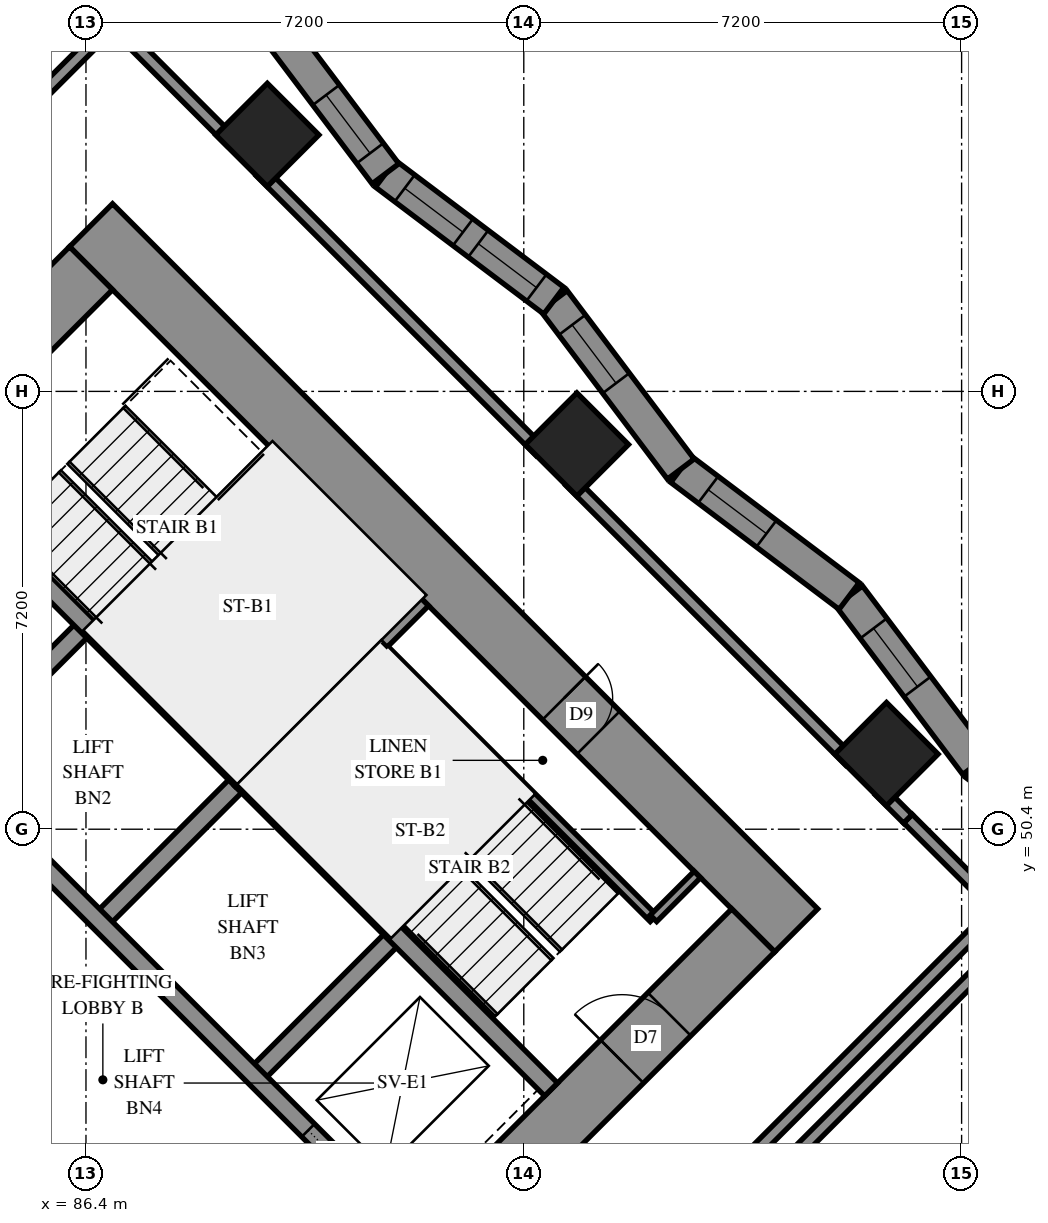
"""IFC4 building model, lengths in metres.
Left out: names, types, materials, properties, quantities, classifications, styles, units other than length and angle.
Written with IfcOpenShell. Run it as: python <this file> out.ifc"""

import sys

from ifc_helpers import new_model, si_unit, direction, frame, frame_2d, origin, origin_2d, place, context, subcontext, project, spatial, polyline, rectangle, outline, extrude, element, fill, save


model = new_model("IFC4")
c1 = context("Model", 3, precision=1e-05, world=origin(), true_north=direction((0.0, 1.0)))
c2 = subcontext(c1, "Body", "Model", "MODEL_VIEW")
j1 = project(units=[si_unit("LENGTHUNIT", "METRE"), si_unit("PLANEANGLEUNIT", "RADIAN")], contexts=[c1])
p1 = place(None, origin())
s1 = spatial("IfcSite", under=j1, at=p1, CompositionType="ELEMENT")
p2 = place(p1, origin())
s2 = spatial("IfcBuilding", under=s1, at=p2, CompositionType="ELEMENT")
p3 = place(p2, frame((0.0, 0.0, 47.4)))
s3 = spatial("IfcBuildingStorey", under=s2, at=p3, CompositionType="ELEMENT", Elevation=47.4)
for number, where, z_axis, x_axis in (
    (1, (89.382, 61.818, 0.0), (0.0, 0.0, 1.0), (0.707, -0.707, 0.0)),
    (2, (94.474, 56.727, 0.0), (0.0, 0.0, 1.0), (0.707, -0.707, 0.0)),
    (3, (99.565, 51.635, 0.0), (0.0, 0.0, 1.0), (0.707, -0.707, 0.0)),
):
    element("IfcColumn", number, at=place(p3, frame(where, z_axis=z_axis, x_axis=x_axis)), inside=s3, PredefinedType="COLUMN", context=c2, shape_type="SweptSolid", body=[
        extrude(rectangle(XDim=1.2, YDim=1.2, at=origin_2d()), origin(), (0.0, 0.0, 1.0), 3.1),
    ])
p4 = place(p3, frame((75.594, 49.443, -0.3), z_axis=(0.0, 0.0, 1.0), x_axis=(0.7071037324, -0.70710983, 0.0)))
e4 = element("IfcWall", 4, at=p4, inside=s3, PredefinedType="SHEAR", context=c2, shape_type="SweptSolid", body=[
    extrude(rectangle(XDim=16.4, YDim=1.0, at=frame_2d((8.2, 0.0))), origin(), (0.0, 0.0, 1.0), 2.7),
])
p5 = place(p3, frame((86.483, 60.333, -0.3), z_axis=(0.0, 0.0, 1.0), x_axis=(0.70710983, -0.7071037324, 0.0)))
e5 = element("IfcWall", 5, at=p5, inside=s3, PredefinedType="SHEAR", context=c2, shape_type="SweptSolid", body=[
    extrude(rectangle(XDim=16.4, YDim=1.0, at=frame_2d((8.2, 0.0))), origin(), (0.0, 0.0, 1.0), 2.7),
])
p6 = place(p5, frame((11.0, 0.0, 0.3)))
e6 = element("IfcOpeningElement", 6, at=p6, cuts=e5, PredefinedType="OPENING", context=c2, shape_type="SweptSolid", body=[
    extrude(rectangle(XDim=0.8, YDim=2.1, at=frame_2d((0.4, 1.05))), frame((0.0, 0.51, 0.0), z_axis=(0.0, -1.0, 0.0), x_axis=(1.0, 0.0, 0.0)), (0.0, 0.0, 1.0), 1.02),
])
p7 = place(p3, frame((76.301, 49.443, -0.3), z_axis=(0.0, 0.0, 1.0), x_axis=(0.7071067812, 0.7071067812, 0.0)))
e7 = element("IfcWall", 7, at=p7, inside=s3, PredefinedType="SHEAR", context=c2, shape_type="SweptSolid", body=[
    extrude(rectangle(XDim=14.4, YDim=1.0, at=frame_2d((7.2, 0.0))), origin(), (0.0, 0.0, 1.0), 2.7),
])
p8 = place(p7, frame((4.55, 0.0, 0.3)))
e8 = element("IfcOpeningElement", 8, at=p8, cuts=e7, PredefinedType="OPENING", context=c2, shape_type="SweptSolid", body=[
    extrude(rectangle(XDim=1.1, YDim=2.1, at=frame_2d((0.55, 1.05))), frame((0.0, 0.51, 0.0), z_axis=(0.0, -1.0, 0.0), x_axis=(1.0, 0.0, 0.0)), (0.0, 0.0, 1.0), 1.02),
])
p9 = place(p7, frame((11.35, 0.0, 0.3)))
e9 = element("IfcOpeningElement", 9, at=p9, cuts=e7, PredefinedType="OPENING", context=c2, shape_type="SweptSolid", body=[
    extrude(rectangle(XDim=1.1, YDim=2.1, at=frame_2d((0.55, 1.05))), frame((0.0, 0.51, 0.0), z_axis=(0.0, -1.0, 0.0), x_axis=(1.0, 0.0, 0.0)), (0.0, 0.0, 1.0), 1.02),
])
p10 = place(p3, frame((87.19, 38.554, -0.3), z_axis=(0.0, 0.0, 1.0), x_axis=(0.707103309, 0.7071102534, 0.0)))
e10 = element("IfcWall", 10, at=p10, inside=s3, PredefinedType="SHEAR", context=c2, shape_type="SweptSolid", body=[
    extrude(rectangle(XDim=14.4, YDim=1.0, at=frame_2d((7.2, 0.0))), origin(), (0.0, 0.0, 1.0), 2.7),
])
p11 = place(p10, frame((4.55, 0.0, 0.3)))
e11 = element("IfcOpeningElement", 11, at=p11, cuts=e10, PredefinedType="OPENING", context=c2, shape_type="SweptSolid", body=[
    extrude(rectangle(XDim=1.1, YDim=2.1, at=frame_2d((0.55, 1.05))), frame((0.0, 0.51, 0.0), z_axis=(0.0, -1.0, 0.0), x_axis=(1.0, 0.0, 0.0)), (0.0, 0.0, 1.0), 1.02),
])
p12 = place(p10, frame((11.35, 0.0, 0.3)))
e12 = element("IfcOpeningElement", 12, at=p12, cuts=e10, PredefinedType="OPENING", context=c2, shape_type="SweptSolid", body=[
    extrude(rectangle(XDim=1.1, YDim=2.1, at=frame_2d((0.55, 1.05))), frame((0.0, 0.51, 0.0), z_axis=(0.0, -1.0, 0.0), x_axis=(1.0, 0.0, 0.0)), (0.0, 0.0, 1.0), 1.02),
])
p13 = place(p3, frame((84.079, 51.423, 0.0), z_axis=(0.0, 0.0, 1.0), x_axis=(0.7071219326, 0.7070916295, 0.0)))
e13 = element("IfcWall", 13, at=p13, inside=s3, PredefinedType="SOLIDWALL", context=c2, shape_type="SweptSolid", body=[
    extrude(rectangle(XDim=3.3, YDim=0.3, at=frame_2d((1.65, 0.0))), origin(), (0.0, 0.0, 1.0), 3.1),
])
for number, where, z_axis, x_axis in (
    (14, (86.625, 48.878, 0.0), (0.0, 0.0, 1.0), (0.707, 0.707, 0.0)),
    (15, (89.17, 46.332, 0.0), (0.0, 0.0, 1.0), (0.707, 0.707, 0.0)),
):
    element("IfcWall", number, at=place(p3, frame(where, z_axis=z_axis, x_axis=x_axis)), inside=s3, PredefinedType="SOLIDWALL", context=c2, shape_type="SweptSolid", body=[
        extrude(rectangle(XDim=3.3, YDim=0.3, at=frame_2d((1.65, 0.0))), origin(), (0.0, 0.0, 1.0), 3.1),
    ])
p14 = place(p3, frame((78.988, 51.423, 0.0), z_axis=(0.0, 0.0, 1.0), x_axis=(0.7071067812, -0.7071067812, 0.0)))
e16 = element("IfcWall", 16, at=p14, inside=s3, PredefinedType="SOLIDWALL", context=c2, shape_type="SweptSolid", body=[
    extrude(rectangle(XDim=14.4, YDim=0.3, at=frame_2d((7.2, 0.0))), origin(), (0.0, 0.0, 1.0), 3.1),
])
p15 = place(p14, frame((1.25, 0.0, 0.0)))
e17 = element("IfcOpeningElement", 17, at=p15, cuts=e16, PredefinedType="OPENING", context=c2, shape_type="SweptSolid", body=[
    extrude(rectangle(XDim=1.1, YDim=2.1, at=frame_2d((0.55, 1.05))), frame((0.0, 0.16, 0.0), z_axis=(0.0, -1.0, 0.0), x_axis=(1.0, 0.0, 0.0)), (0.0, 0.0, 1.0), 0.32),
])
p16 = place(p14, frame((4.85, 0.0, 0.0)))
e18 = element("IfcOpeningElement", 18, at=p16, cuts=e16, PredefinedType="OPENING", context=c2, shape_type="SweptSolid", body=[
    extrude(rectangle(XDim=1.1, YDim=2.1, at=frame_2d((0.55, 1.05))), frame((0.0, 0.16, 0.0), z_axis=(0.0, -1.0, 0.0), x_axis=(1.0, 0.0, 0.0)), (0.0, 0.0, 1.0), 0.32),
])
p17 = place(p14, frame((8.45, 0.0, 0.0)))
e19 = element("IfcOpeningElement", 19, at=p17, cuts=e16, PredefinedType="OPENING", context=c2, shape_type="SweptSolid", body=[
    extrude(rectangle(XDim=1.1, YDim=2.1, at=frame_2d((0.55, 1.05))), frame((0.0, 0.16, 0.0), z_axis=(0.0, -1.0, 0.0), x_axis=(1.0, 0.0, 0.0)), (0.0, 0.0, 1.0), 0.32),
])
p18 = place(p14, frame((12.05, 0.0, 0.0)))
e20 = element("IfcOpeningElement", 20, at=p18, cuts=e16, PredefinedType="OPENING", context=c2, shape_type="SweptSolid", body=[
    extrude(rectangle(XDim=1.1, YDim=2.1, at=frame_2d((0.55, 1.05))), frame((0.0, 0.16, 0.0), z_axis=(0.0, -1.0, 0.0), x_axis=(1.0, 0.0, 0.0)), (0.0, 0.0, 1.0), 0.32),
])
p19 = place(p3, frame((81.534, 53.969, 0.0), z_axis=(0.0, 0.0, 1.0), x_axis=(0.707103309, -0.7071102534, 0.0)))
e21 = element("IfcWall", 21, at=p19, inside=s3, PredefinedType="SOLIDWALL", context=c2, shape_type="SweptSolid", body=[
    extrude(rectangle(XDim=14.4, YDim=0.3, at=frame_2d((7.2, 0.0))), origin(), (0.0, 0.0, 1.0), 3.1),
])
p20 = place(p19, frame((12.05, 0.0, 0.0)))
e22 = element("IfcOpeningElement", 22, at=p20, cuts=e21, PredefinedType="OPENING", context=c2, shape_type="SweptSolid", body=[
    extrude(rectangle(XDim=1.1, YDim=2.1, at=frame_2d((0.55, 1.05))), frame((0.0, 0.16, 0.0), z_axis=(0.0, -1.0, 0.0), x_axis=(1.0, 0.0, 0.0)), (0.0, 0.0, 1.0), 0.32),
])
for number, where, z_axis, x_axis in (
    (23, (83.867, 56.302, 0.0), (0.0, 0.0, 1.0), (0.707, -0.707, 0.0)),
    (24, (88.958, 51.211, 0.0), (0.0, 0.0, 1.0), (0.707, -0.707, 0.0)),
):
    element("IfcWall", number, at=place(p3, frame(where, z_axis=z_axis, x_axis=x_axis)), inside=s3, PredefinedType="SOLIDWALL", context=c2, shape_type="SweptSolid", body=[
        extrude(rectangle(XDim=7.2, YDim=0.3, at=frame_2d((3.6, 0.0))), origin(), (0.0, 0.0, 1.0), 3.1),
    ])
p21 = place(p3, frame((88.958, 51.211, 0.0), z_axis=(0.0, 0.0, 1.0), x_axis=(0.7071067812, 0.7071067812, 0.0)))
e25 = element("IfcWall", 25, at=p21, inside=s3, PredefinedType="SOLIDWALL", context=c2, shape_type="SweptSolid", body=[
    extrude(rectangle(XDim=4.2, YDim=0.3, at=frame_2d((2.1, 0.0))), origin(), (0.0, 0.0, 1.0), 3.1),
])
p22 = place(p3, frame((103.807, 49.379, 0.0), z_axis=(0.0, 0.0, 1.0), x_axis=(-0.7985338376, 0.6019499233, 0.0)))
e26 = element("IfcWall", 26, at=p22, inside=s3, PredefinedType="SOLIDWALL", context=c2, shape_type="SweptSolid", body=[
    extrude(outline(polyline([(-0.039, -0.275), (3.429, -0.275), (3.506, 0.275), (0.039, 0.275), (-0.039, -0.275)])), origin(), (0.0, 0.0, 1.0), 3.1),
])
p23 = place(p22, frame((1.536, 0.0, 0.5)))
e27 = element("IfcOpeningElement", 27, at=p23, cuts=e26, PredefinedType="OPENING", context=c2, shape_type="SweptSolid", body=[
    extrude(rectangle(XDim=1.2, YDim=2.45, at=frame_2d((0.6, 1.225))), frame((0.0, 0.285, 0.0), z_axis=(0.0, -1.0, 0.0), x_axis=(1.0, 0.0, 0.0)), (0.0, 0.0, 1.0), 0.57),
])
p24 = place(p3, frame((101.038, 51.466, 0.0), z_axis=(0.0, 0.0, 1.0), x_axis=(-0.6019499233, 0.7985338376, 0.0)))
e28 = element("IfcWall", 28, at=p24, inside=s3, PredefinedType="SOLIDWALL", context=c2, shape_type="SweptSolid", body=[
    extrude(outline(polyline([(0.039, -0.275), (3.506, -0.275), (3.429, 0.275), (-0.039, 0.275), (0.039, -0.275)])), origin(), (0.0, 0.0, 1.0), 3.1),
])
p25 = place(p24, frame((1.601, 0.0, 0.5)))
e29 = element("IfcOpeningElement", 29, at=p25, cuts=e28, PredefinedType="OPENING", context=c2, shape_type="SweptSolid", body=[
    extrude(rectangle(XDim=1.2, YDim=2.45, at=frame_2d((0.6, 1.225))), frame((0.0, 0.285, 0.0), z_axis=(0.0, -1.0, 0.0), x_axis=(1.0, 0.0, 0.0)), (0.0, 0.0, 1.0), 0.57),
])
p26 = place(p3, frame((98.951, 54.235, 0.0), z_axis=(0.0, 0.0, 1.0), x_axis=(-0.7985199762, 0.6019683111, 0.0)))
e30 = element("IfcWall", 30, at=p26, inside=s3, PredefinedType="SOLIDWALL", context=c2, shape_type="SweptSolid", body=[
    extrude(outline(polyline([(-0.039, -0.275), (3.429, -0.275), (3.506, 0.275), (0.039, 0.275), (-0.039, -0.275)])), origin(), (0.0, 0.0, 1.0), 3.1),
])
p27 = place(p26, frame((1.704, 0.0, 0.5)))
e31 = element("IfcOpeningElement", 31, at=p27, cuts=e30, PredefinedType="OPENING", context=c2, shape_type="SweptSolid", body=[
    extrude(rectangle(XDim=1.2, YDim=2.45, at=frame_2d((0.6, 1.225))), frame((0.0, 0.285, 0.0), z_axis=(0.0, -1.0, 0.0), x_axis=(1.0, 0.0, 0.0)), (0.0, 0.0, 1.0), 0.57),
])
p28 = place(p3, frame((96.182, 56.323, 0.0), z_axis=(0.0, 0.0, 1.0), x_axis=(-0.601963785, 0.7985233882, 0.0)))
e32 = element("IfcWall", 32, at=p28, inside=s3, PredefinedType="SOLIDWALL", context=c2, shape_type="SweptSolid", body=[
    extrude(outline(polyline([(0.039, -0.275), (3.506, -0.275), (3.429, 0.275), (-0.039, 0.275), (0.039, -0.275)])), origin(), (0.0, 0.0, 1.0), 3.1),
])
p29 = place(p28, frame((1.768, 0.0, 0.5)))
e33 = element("IfcOpeningElement", 33, at=p29, cuts=e32, PredefinedType="OPENING", context=c2, shape_type="SweptSolid", body=[
    extrude(rectangle(XDim=1.2, YDim=2.45, at=frame_2d((0.6, 1.225))), frame((0.0, 0.285, 0.0), z_axis=(0.0, -1.0, 0.0), x_axis=(1.0, 0.0, 0.0)), (0.0, 0.0, 1.0), 0.57),
])
p30 = place(p3, frame((94.094, 59.092, 0.0), z_axis=(0.0, 0.0, 1.0), x_axis=(-0.7985199762, 0.6019683111, 0.0)))
e34 = element("IfcWall", 34, at=p30, inside=s3, PredefinedType="SOLIDWALL", context=c2, shape_type="SweptSolid", body=[
    extrude(outline(polyline([(-0.039, -0.275), (3.429, -0.275), (3.506, 0.275), (0.039, 0.275), (-0.039, -0.275)])), origin(), (0.0, 0.0, 1.0), 3.1),
])
p31 = place(p30, frame((0.357, 0.0, 0.5)))
e35 = element("IfcOpeningElement", 35, at=p31, cuts=e34, PredefinedType="OPENING", context=c2, shape_type="SweptSolid", body=[
    extrude(rectangle(XDim=1.2, YDim=2.45, at=frame_2d((0.6, 1.225))), frame((0.0, 0.285, 0.0), z_axis=(0.0, -1.0, 0.0), x_axis=(1.0, 0.0, 0.0)), (0.0, 0.0, 1.0), 0.57),
])
p32 = place(p30, frame((1.872, 0.0, 0.5)))
e36 = element("IfcOpeningElement", 36, at=p32, cuts=e34, PredefinedType="OPENING", context=c2, shape_type="SweptSolid", body=[
    extrude(rectangle(XDim=1.2, YDim=2.45, at=frame_2d((0.6, 1.225))), frame((0.0, 0.285, 0.0), z_axis=(0.0, -1.0, 0.0), x_axis=(1.0, 0.0, 0.0)), (0.0, 0.0, 1.0), 0.57),
])
p33 = place(p3, frame((91.325, 61.179, 0.0), z_axis=(0.0, 0.0, 1.0), x_axis=(-0.6019499233, 0.7985338376, 0.0)))
e37 = element("IfcWall", 37, at=p33, inside=s3, PredefinedType="SOLIDWALL", context=c2, shape_type="SweptSolid", body=[
    extrude(outline(polyline([(0.039, -0.275), (3.506, -0.275), (3.429, 0.275), (-0.039, 0.275), (0.039, -0.275)])), origin(), (0.0, 0.0, 1.0), 3.1),
])
p34 = place(p33, frame((0.421, 0.0, 0.5)))
e38 = element("IfcOpeningElement", 38, at=p34, cuts=e37, PredefinedType="OPENING", context=c2, shape_type="SweptSolid", body=[
    extrude(rectangle(XDim=1.2, YDim=2.45, at=frame_2d((0.6, 1.225))), frame((0.0, 0.285, 0.0), z_axis=(0.0, -1.0, 0.0), x_axis=(1.0, 0.0, 0.0)), (0.0, 0.0, 1.0), 0.57),
])
p35 = place(p3, frame((91.313, 53.354, 0.0), z_axis=(0.0, 0.0, 1.0), x_axis=(0.7071147811, -0.7070987812, 0.0)))
e39 = element("IfcWall", 39, at=p35, inside=s3, PredefinedType="PARTITIONING", context=c2, shape_type="SweptSolid", body=[
    extrude(rectangle(XDim=6.25, YDim=0.15, at=frame_2d((3.125, 0.0))), origin(), (0.0, 0.0, 1.0), 3.1),
])
p36 = place(p3, frame((95.732, 48.934, 0.0), z_axis=(0.0, 0.0, 1.0), x_axis=(0.7071067812, 0.7071067812, 0.0)))
e40 = element("IfcWall", 40, at=p36, inside=s3, PredefinedType="PARTITIONING", context=c2, shape_type="SweptSolid", body=[
    extrude(rectangle(XDim=1.02, YDim=0.15, at=frame_2d((0.51, 0.0))), origin(), (0.0, 0.0, 1.0), 3.1),
])
p37 = place(p3, frame((95.109, 42.091, 0.0), z_axis=(0.0, 0.0, 1.0), x_axis=(0.7071113741, 0.7071021882, 0.0)))
e41 = element("IfcWall", 41, at=p37, inside=s3, PredefinedType="PARTITIONING", context=c2, shape_type="SweptSolid", body=[
    extrude(rectangle(XDim=10.886, YDim=0.2, at=frame_2d((5.443, 0.0))), origin(), (0.0, 0.0, 1.0), 3.1),
])
p38 = place(p3, frame((94.757, 42.445, 0.0), z_axis=(0.0, 0.0, 1.0), x_axis=(0.7071067812, 0.7071067812, 0.0)))
e42 = element("IfcWall", 42, at=p38, inside=s3, PredefinedType="PARTITIONING", context=c2, shape_type="SweptSolid", body=[
    extrude(rectangle(XDim=9.399, YDim=0.2, at=frame_2d((4.699, 0.0))), origin(), (0.0, 0.0, 1.0), 3.1),
])
p39 = place(p3, frame((81.052, 57.873, 0.0), z_axis=(0.0, 0.0, 1.0), x_axis=(0.7071067812, 0.7071067812, 0.0)))
e43 = element("IfcWall", 43, at=p39, inside=s3, PredefinedType="PARTITIONING", context=c2, shape_type="SweptSolid", body=[
    extrude(rectangle(XDim=8.18, YDim=0.2, at=frame_2d((4.09, 0.0))), origin(), (0.0, 0.0, 1.0), 3.1),
])
p40 = place(p39, frame((0.823, 0.0, 0.0)))
e44 = element("IfcOpeningElement", 44, at=p40, cuts=e43, PredefinedType="OPENING", context=c2, shape_type="SweptSolid", body=[
    extrude(rectangle(XDim=1.0, YDim=2.1, at=frame_2d((0.5, 1.05))), frame((0.0, 0.11, 0.0), z_axis=(0.0, -1.0, 0.0), x_axis=(1.0, 0.0, 0.0)), (0.0, 0.0, 1.0), 0.22),
])
p41 = place(p3, frame((89.271, 61.215, 0.0), z_axis=(0.0, 0.0, 1.0), x_axis=(0.7071067812, -0.7071067812, 0.0)))
e45 = element("IfcWall", 45, at=p41, inside=s3, PredefinedType="PARTITIONING", context=c2, shape_type="SweptSolid", body=[
    extrude(rectangle(XDim=6.505, YDim=0.2, at=frame_2d((3.253, 0.0))), origin(), (0.0, 0.0, 1.0), 3.1),
])
p42 = place(p3, frame((94.363, 56.123, 0.0), z_axis=(0.0, 0.0, 1.0), x_axis=(0.7071067812, -0.7071067812, 0.0)))
e46 = element("IfcWall", 46, at=p42, inside=s3, PredefinedType="PARTITIONING", context=c2, shape_type="SweptSolid", body=[
    extrude(rectangle(XDim=6.503, YDim=0.2, at=frame_2d((3.251, 0.0))), origin(), (0.0, 0.0, 1.0), 3.1),
])
p43 = place(p3, frame((86.841, 63.659, 0.0), z_axis=(0.0, 0.0, 1.0), x_axis=(0.7067795096, -0.7074339014, 0.0)))
e47 = element("IfcWall", 47, at=p43, inside=s3, PredefinedType="PARTITIONING", context=c2, shape_type="SweptSolid", body=[
    extrude(rectangle(XDim=2.751, YDim=0.2, at=frame_2d((1.375, 0.0))), origin(), (0.0, 0.0, 1.0), 3.1),
])
p44 = place(p3, frame((99.918, 50.574, 0.0), z_axis=(0.0, 0.0, 1.0), x_axis=(0.7075827869, -0.7066304548, 0.0)))
e48 = element("IfcWall", 48, at=p44, inside=s3, PredefinedType="PARTITIONING", context=c2, shape_type="SweptSolid", body=[
    extrude(rectangle(XDim=2.1, YDim=0.2, at=frame_2d((1.05, 0.0))), origin(), (0.0, 0.0, 1.0), 3.1),
])
p45 = place(p3, frame((99.453, 51.033, 0.0), z_axis=(0.0, 0.0, 1.0), x_axis=(0.7071067812, -0.7071067812, 0.0)))
e49 = element("IfcWall", 49, at=p45, inside=s3, PredefinedType="PARTITIONING", context=c2, shape_type="SweptSolid", body=[
    extrude(rectangle(XDim=0.653, YDim=0.2, at=frame_2d((0.327, 0.0))), origin(), (0.0, 0.0, 1.0), 3.1),
])
p46 = place(p25, origin())
e50 = element("IfcWindow", 50, at=p46, inside=s3, PartitioningType="SINGLE_PANEL", PredefinedType="WINDOW", context=c2, shape_type="SweptSolid", body=[
    extrude(rectangle(XDim=1.2, YDim=2.45, at=frame_2d((0.6, 1.225))), frame((0.0, 0.155, 0.0), z_axis=(0.0, -1.0, 0.0), x_axis=(1.0, 0.0, 0.0)), (0.0, 0.0, 1.0), 0.06),
])
fill(e29, e50)
p47 = place(p27, origin())
e51 = element("IfcWindow", 51, at=p47, inside=s3, PartitioningType="SINGLE_PANEL", PredefinedType="WINDOW", context=c2, shape_type="SweptSolid", body=[
    extrude(rectangle(XDim=1.2, YDim=2.45, at=frame_2d((0.6, 1.225))), frame((0.0, 0.155, 0.0), z_axis=(0.0, -1.0, 0.0), x_axis=(1.0, 0.0, 0.0)), (0.0, 0.0, 1.0), 0.06),
])
fill(e31, e51)
p48 = place(p29, origin())
e52 = element("IfcWindow", 52, at=p48, inside=s3, PartitioningType="SINGLE_PANEL", PredefinedType="WINDOW", context=c2, shape_type="SweptSolid", body=[
    extrude(rectangle(XDim=1.2, YDim=2.45, at=frame_2d((0.6, 1.225))), frame((0.0, 0.155, 0.0), z_axis=(0.0, -1.0, 0.0), x_axis=(1.0, 0.0, 0.0)), (0.0, 0.0, 1.0), 0.06),
])
fill(e33, e52)
p49 = place(p31, origin())
e53 = element("IfcWindow", 53, at=p49, inside=s3, PartitioningType="SINGLE_PANEL", PredefinedType="WINDOW", context=c2, shape_type="SweptSolid", body=[
    extrude(rectangle(XDim=1.2, YDim=2.45, at=frame_2d((0.6, 1.225))), frame((0.0, 0.155, 0.0), z_axis=(0.0, -1.0, 0.0), x_axis=(1.0, 0.0, 0.0)), (0.0, 0.0, 1.0), 0.06),
])
fill(e35, e53)
p50 = place(p32, origin())
e54 = element("IfcWindow", 54, at=p50, inside=s3, PartitioningType="SINGLE_PANEL", PredefinedType="WINDOW", context=c2, shape_type="SweptSolid", body=[
    extrude(rectangle(XDim=1.2, YDim=2.45, at=frame_2d((0.6, 1.225))), frame((0.0, 0.155, 0.0), z_axis=(0.0, -1.0, 0.0), x_axis=(1.0, 0.0, 0.0)), (0.0, 0.0, 1.0), 0.06),
])
fill(e36, e54)
p51 = place(p34, origin())
e55 = element("IfcWindow", 55, at=p51, inside=s3, PartitioningType="SINGLE_PANEL", PredefinedType="WINDOW", context=c2, shape_type="SweptSolid", body=[
    extrude(rectangle(XDim=1.2, YDim=2.45, at=frame_2d((0.6, 1.225))), frame((0.0, 0.155, 0.0), z_axis=(0.0, -1.0, 0.0), x_axis=(1.0, 0.0, 0.0)), (0.0, 0.0, 1.0), 0.06),
])
fill(e38, e55)
p52 = place(p6, origin())
e56 = element("IfcDoor", 56, at=p52, inside=s3, OperationType="SINGLE_SWING_RIGHT", PredefinedType="DOOR", context=c2, shape_type="SweptSolid", body=[
    extrude(rectangle(XDim=0.8, YDim=2.1, at=frame_2d((0.4, 1.05))), frame((0.0, -0.44, 0.0), z_axis=(0.0, -1.0, 0.0), x_axis=(1.0, 0.0, 0.0)), (0.0, 0.0, 1.0), 0.05),
])
fill(e6, e56)
p53 = place(p12, origin())
e57 = element("IfcDoor", 57, at=p53, inside=s3, OperationType="SINGLE_SWING_RIGHT", PredefinedType="DOOR", context=c2, shape_type="SweptSolid", body=[
    extrude(rectangle(XDim=1.1, YDim=2.1, at=frame_2d((0.55, 1.05))), frame((0.0, 0.025, 0.0), z_axis=(0.0, -1.0, 0.0), x_axis=(1.0, 0.0, 0.0)), (0.0, 0.0, 1.0), 0.05),
])
fill(e12, e57)
p54 = place(p20, origin())
e58 = element("IfcDoor", 58, at=p54, inside=s3, OperationType="SLIDING_TO_RIGHT", PredefinedType="DOOR", context=c2, shape_type="SweptSolid", body=[
    extrude(rectangle(XDim=1.1, YDim=2.1, at=frame_2d((0.55, 1.05))), frame((0.0, 0.025, 0.0), z_axis=(0.0, -1.0, 0.0), x_axis=(1.0, 0.0, 0.0)), (0.0, 0.0, 1.0), 0.05),
])
fill(e22, e58)
save(model, sys.argv[1])
